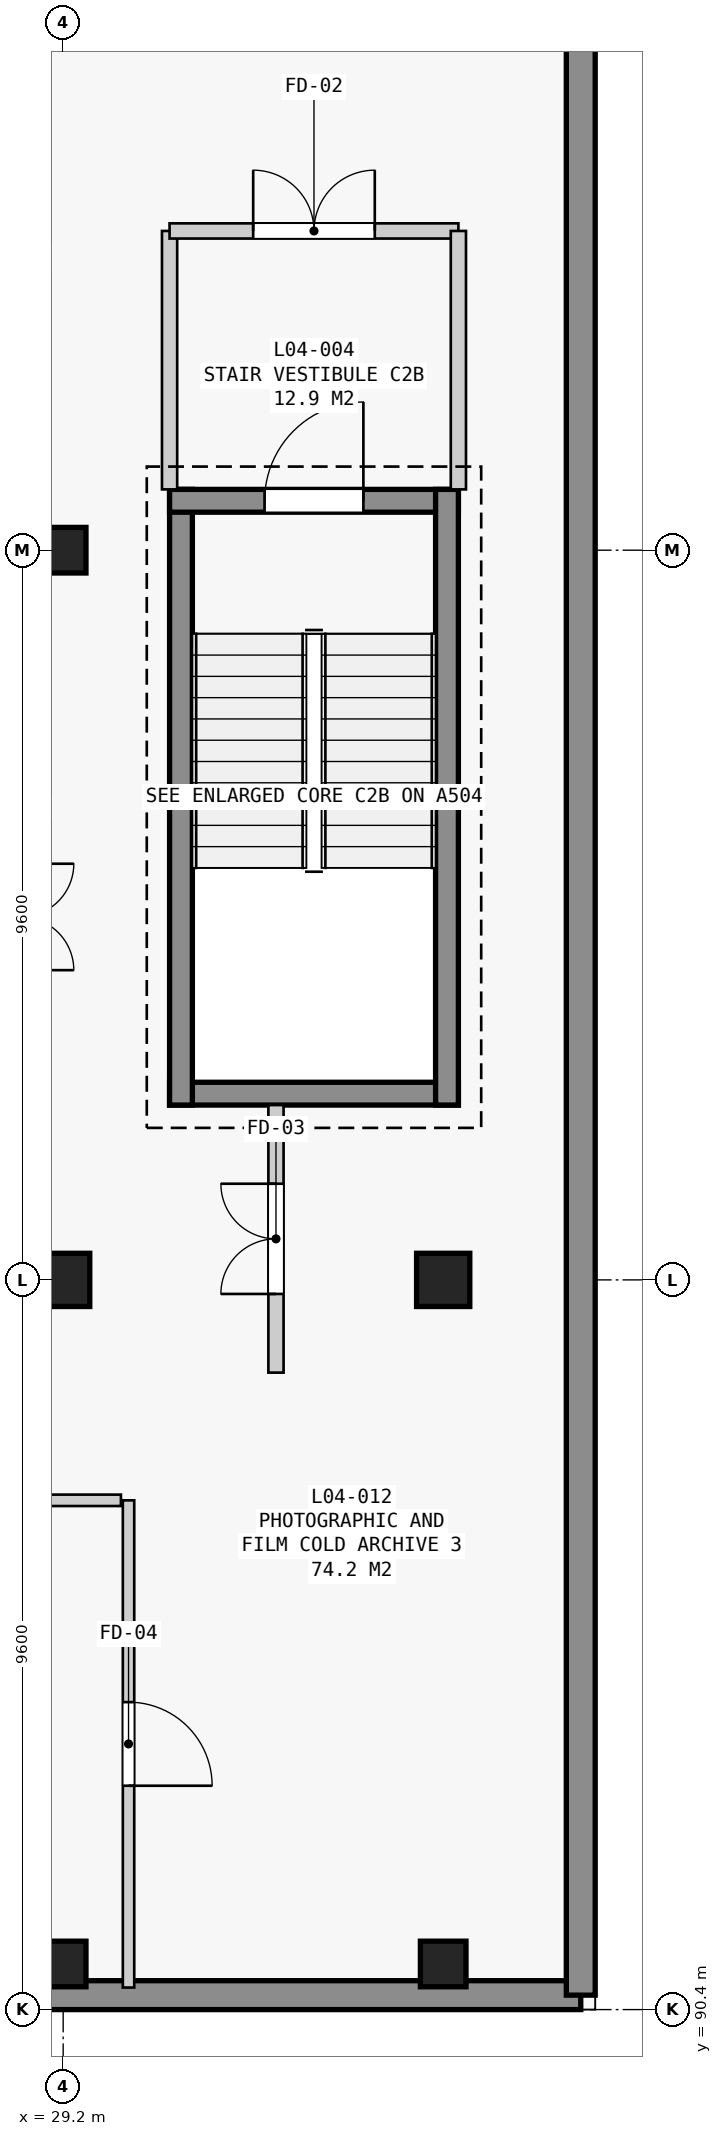
"""IFC4 building model, lengths in metres.
Left out: names, types, materials, properties, quantities, classifications, styles, units other than length and angle.
Written with IfcOpenShell. Run it as: python <this file> out.ifc"""

import sys

from ifc_helpers import new_model, si_unit, direction, frame, frame_2d, origin, origin_2d, place, context, subcontext, project, spatial, rectangle, extrude, element, fill, save


model = new_model("IFC4")
c1 = context("Model", 3, precision=1e-05, world=origin(), true_north=direction((0.0, 1.0)))
c2 = subcontext(c1, "Body", "Model", "MODEL_VIEW")
j1 = project(units=[si_unit("LENGTHUNIT", "METRE"), si_unit("PLANEANGLEUNIT", "RADIAN")], contexts=[c1])
p1 = place(None, origin())
s1 = spatial("IfcSite", under=j1, at=p1, CompositionType="ELEMENT")
p2 = place(p1, origin())
s2 = spatial("IfcBuilding", under=s1, at=p2, CompositionType="ELEMENT")
p3 = place(p2, frame((0.0, 0.0, 18.3)))
s3 = spatial("IfcBuildingStorey", under=s2, at=p3, CompositionType="ELEMENT", Elevation=18.3)
p4 = place(p3, frame((29.2, 91.0, 0.0), z_axis=(0.0, 0.0, 1.0), x_axis=(1.0, 0.0, 0.0)))
e1 = element("IfcColumn", 1, at=p4, inside=s3, PredefinedType="COLUMN", context=c2, shape_type="SweptSolid", body=[
    extrude(rectangle(XDim=0.6, YDim=0.6, at=origin_2d()), origin(), (0.0, 0.0, 1.0), 4.2),
])
p5 = place(p3, frame((29.2, 100.0, 0.0), z_axis=(0.0, 0.0, 1.0), x_axis=(1.0, 0.0, 0.0)))
e2 = element("IfcColumn", 2, at=p5, inside=s3, PredefinedType="COLUMN", context=c2, shape_type="SweptSolid", body=[
    extrude(rectangle(XDim=0.7, YDim=0.7, at=origin_2d()), origin(), (0.0, 0.0, 1.0), 4.2),
])
for number, where, z_axis, x_axis in (
    (3, (29.2, 109.6, 0.0), (0.0, 0.0, 1.0), (1.0, 0.0, 0.0)),
    (4, (34.2, 91.0, 0.0), (0.0, 0.0, 1.0), (1.0, 0.0, 0.0)),
):
    element("IfcColumn", number, at=place(p3, frame(where, z_axis=z_axis, x_axis=x_axis)), inside=s3, PredefinedType="COLUMN", context=c2, shape_type="SweptSolid", body=[
        extrude(rectangle(XDim=0.6, YDim=0.6, at=origin_2d()), origin(), (0.0, 0.0, 1.0), 4.2),
    ])
p6 = place(p3, frame((34.2, 100.0, 0.0), z_axis=(0.0, 0.0, 1.0), x_axis=(1.0, 0.0, 0.0)))
e5 = element("IfcColumn", 5, at=p6, inside=s3, PredefinedType="COLUMN", context=c2, shape_type="SweptSolid", body=[
    extrude(rectangle(XDim=0.7, YDim=0.7, at=origin_2d()), origin(), (0.0, 0.0, 1.0), 4.2),
])
p7 = place(p3, frame((36.01, 90.59, 0.0), z_axis=(0.0, 0.0, 1.0), x_axis=(-1.0, 0.0, 0.0)))
e6 = element("IfcWall", 6, at=p7, inside=s3, PredefinedType="STANDARD", context=c2, shape_type="SweptSolid", body=[
    extrude(rectangle(XDim=23.42, YDim=0.38, at=frame_2d((11.71, 0.0))), origin(), (0.0, 0.0, 1.0), 3.94),
])
p8 = place(p3, frame((36.01, 117.81, 0.0), z_axis=(0.0, 0.0, 1.0), x_axis=(0.0, -1.0, 0.0)))
e7 = element("IfcWall", 7, at=p8, inside=s3, PredefinedType="STANDARD", context=c2, shape_type="SweptSolid", body=[
    extrude(rectangle(XDim=27.22, YDim=0.38, at=frame_2d((13.61, 0.0))), origin(), (0.0, 0.0, 1.0), 3.94),
])
p9 = place(p3, frame((34.4, 102.45, 0.0), z_axis=(0.0, 0.0, 1.0), x_axis=(-1.0, 0.0, 0.0)))
e8 = element("IfcWall", 8, at=p9, inside=s3, PredefinedType="SHEAR", context=c2, shape_type="SweptSolid", body=[
    extrude(rectangle(XDim=3.8, YDim=0.3, at=frame_2d((1.9, 0.0))), origin(), (0.0, 0.0, 1.0), 3.88),
])
p10 = place(p3, frame((30.75, 102.3, 0.0), z_axis=(0.0, 0.0, 1.0), x_axis=(0.0, 1.0, 0.0)))
e9 = element("IfcWall", 9, at=p10, inside=s3, PredefinedType="SHEAR", context=c2, shape_type="SweptSolid", body=[
    extrude(rectangle(XDim=8.1, YDim=0.3, at=frame_2d((4.05, 0.0))), origin(), (0.0, 0.0, 1.0), 3.88),
])
p11 = place(p3, frame((30.6, 110.25, 0.0), z_axis=(0.0, 0.0, 1.0), x_axis=(1.0, 0.0, 0.0)))
e10 = element("IfcWall", 10, at=p11, inside=s3, PredefinedType="SHEAR", context=c2, shape_type="SweptSolid", body=[
    extrude(rectangle(XDim=3.8, YDim=0.3, at=frame_2d((1.9, 0.0))), origin(), (0.0, 0.0, 1.0), 3.88),
])
p12 = place(p11, frame((1.25, 0.0, 0.0)))
e11 = element("IfcOpeningElement", 11, at=p12, cuts=e10, PredefinedType="OPENING", context=c2, shape_type="SweptSolid", body=[
    extrude(rectangle(XDim=1.3, YDim=2.2, at=frame_2d((0.65, 1.1))), frame((0.0, 0.16, 0.0), z_axis=(0.0, -1.0, 0.0), x_axis=(1.0, 0.0, 0.0)), (0.0, 0.0, 1.0), 0.32),
])
p13 = place(p3, frame((34.25, 110.4, 0.0), z_axis=(0.0, 0.0, 1.0), x_axis=(0.0, -1.0, 0.0)))
e12 = element("IfcWall", 12, at=p13, inside=s3, PredefinedType="SHEAR", context=c2, shape_type="SweptSolid", body=[
    extrude(rectangle(XDim=8.1, YDim=0.3, at=frame_2d((4.05, 0.0))), origin(), (0.0, 0.0, 1.0), 3.88),
])
p14 = place(p3, frame((30.6, 110.4, 0.0), z_axis=(0.0, 0.0, 1.0), x_axis=(0.0, 1.0, 0.0)))
e13 = element("IfcWall", 13, at=p14, inside=s3, PredefinedType="STANDARD", context=c2, shape_type="SweptSolid", body=[
    extrude(rectangle(XDim=3.4, YDim=0.2, at=frame_2d((1.7, 0.0))), origin(), (0.0, 0.0, 1.0), 3.88),
])
p15 = place(p3, frame((30.6, 113.8, 0.0), z_axis=(0.0, 0.0, 1.0), x_axis=(1.0, 0.0, 0.0)))
e14 = element("IfcWall", 14, at=p15, inside=s3, PredefinedType="STANDARD", context=c2, shape_type="SweptSolid", body=[
    extrude(rectangle(XDim=3.8, YDim=0.2, at=frame_2d((1.9, 0.0))), origin(), (0.0, 0.0, 1.0), 3.88),
])
p16 = place(p15, frame((1.1, 0.0, 0.0)))
e15 = element("IfcOpeningElement", 15, at=p16, cuts=e14, PredefinedType="OPENING", context=c2, shape_type="SweptSolid", body=[
    extrude(rectangle(XDim=1.6, YDim=2.2, at=frame_2d((0.8, 1.1))), frame((0.0, 0.11, 0.0), z_axis=(0.0, -1.0, 0.0), x_axis=(1.0, 0.0, 0.0)), (0.0, 0.0, 1.0), 0.22),
])
p17 = place(p3, frame((34.4, 113.8, 0.0), z_axis=(0.0, 0.0, 1.0), x_axis=(0.0, -1.0, 0.0)))
e16 = element("IfcWall", 16, at=p17, inside=s3, PredefinedType="STANDARD", context=c2, shape_type="SweptSolid", body=[
    extrude(rectangle(XDim=3.4, YDim=0.2, at=frame_2d((1.7, 0.0))), origin(), (0.0, 0.0, 1.0), 3.88),
])
p18 = place(p3, frame((30.06, 97.1, 0.0), z_axis=(0.0, 0.0, 1.0), x_axis=(0.0, -1.0, 0.0)))
e17 = element("IfcWall", 17, at=p18, inside=s3, PredefinedType="PARTITIONING", context=c2, shape_type="SweptSolid", body=[
    extrude(rectangle(XDim=6.41, YDim=0.15, at=frame_2d((3.205, 0.0))), origin(), (0.0, 0.0, 1.0), 3.12),
])
p19 = place(p18, frame((2.655, 0.0, 0.0)))
e18 = element("IfcOpeningElement", 18, at=p19, cuts=e17, PredefinedType="OPENING", context=c2, shape_type="SweptSolid", body=[
    extrude(rectangle(XDim=1.1, YDim=2.15, at=frame_2d((0.55, 1.075))), frame((0.0, 0.085, 0.0), z_axis=(0.0, -1.0, 0.0), x_axis=(1.0, 0.0, 0.0)), (0.0, 0.0, 1.0), 0.17),
])
p20 = place(p3, frame((24.4, 97.1, 0.0), z_axis=(0.0, 0.0, 1.0), x_axis=(1.0, 0.0, 0.0)))
e19 = element("IfcWall", 19, at=p20, inside=s3, PredefinedType="PARTITIONING", context=c2, shape_type="SweptSolid", body=[
    extrude(rectangle(XDim=5.56, YDim=0.15, at=frame_2d((2.78, 0.0))), origin(), (0.0, 0.0, 1.0), 3.12),
])
p21 = place(p3, frame((32.0, 98.78, 0.0), z_axis=(0.0, 0.0, 1.0), x_axis=(0.0, 1.0, 0.0)))
e20 = element("IfcWall", 20, at=p21, inside=s3, PredefinedType="STANDARD", context=c2, shape_type="SweptSolid", body=[
    extrude(rectangle(XDim=3.52, YDim=0.2, at=frame_2d((1.76, 0.0))), origin(), (0.0, 0.0, 1.0), 3.16),
])
p22 = place(p21, frame((1.035, 0.0, 0.0)))
e21 = element("IfcOpeningElement", 21, at=p22, cuts=e20, PredefinedType="OPENING", context=c2, shape_type="SweptSolid", body=[
    extrude(rectangle(XDim=1.45, YDim=2.2, at=frame_2d((0.725, 1.1))), frame((0.0, 0.11, 0.0), z_axis=(0.0, -1.0, 0.0), x_axis=(1.0, 0.0, 0.0)), (0.0, 0.0, 1.0), 0.22),
])
p23 = place(p12, origin())
e22 = element("IfcDoor", 22, at=p23, inside=s3, OperationType="SINGLE_SWING_RIGHT", PredefinedType="DOOR", context=c2, shape_type="SweptSolid", body=[
    extrude(rectangle(XDim=1.3, YDim=2.2, at=frame_2d((0.65, 1.1))), frame((0.0, 0.025, 0.0), z_axis=(0.0, -1.0, 0.0), x_axis=(1.0, 0.0, 0.0)), (0.0, 0.0, 1.0), 0.05),
])
fill(e11, e22)
p24 = place(p16, origin())
e23 = element("IfcDoor", 23, at=p24, inside=s3, OperationType="DOUBLE_DOOR_SINGLE_SWING", PredefinedType="DOOR", context=c2, shape_type="SweptSolid", body=[
    extrude(rectangle(XDim=1.6, YDim=2.2, at=frame_2d((0.8, 1.1))), frame((0.0, 0.025, 0.0), z_axis=(0.0, -1.0, 0.0), x_axis=(1.0, 0.0, 0.0)), (0.0, 0.0, 1.0), 0.05),
])
fill(e15, e23)
p25 = place(p19, origin())
e24 = element("IfcDoor", 24, at=p25, inside=s3, OperationType="SINGLE_SWING_RIGHT", PredefinedType="DOOR", context=c2, shape_type="SweptSolid", body=[
    extrude(rectangle(XDim=1.1, YDim=2.15, at=frame_2d((0.55, 1.075))), frame((0.0, 0.025, 0.0), z_axis=(0.0, -1.0, 0.0), x_axis=(1.0, 0.0, 0.0)), (0.0, 0.0, 1.0), 0.05),
])
fill(e18, e24)
p26 = place(p22, origin())
e25 = element("IfcDoor", 25, at=p26, inside=s3, OperationType="DOUBLE_DOOR_SINGLE_SWING", PredefinedType="DOOR", context=c2, shape_type="SweptSolid", body=[
    extrude(rectangle(XDim=1.45, YDim=2.2, at=frame_2d((0.725, 1.1))), frame((0.0, 0.025, 0.0), z_axis=(0.0, -1.0, 0.0), x_axis=(1.0, 0.0, 0.0)), (0.0, 0.0, 1.0), 0.05),
])
fill(e21, e25)
save(model, sys.argv[1])
